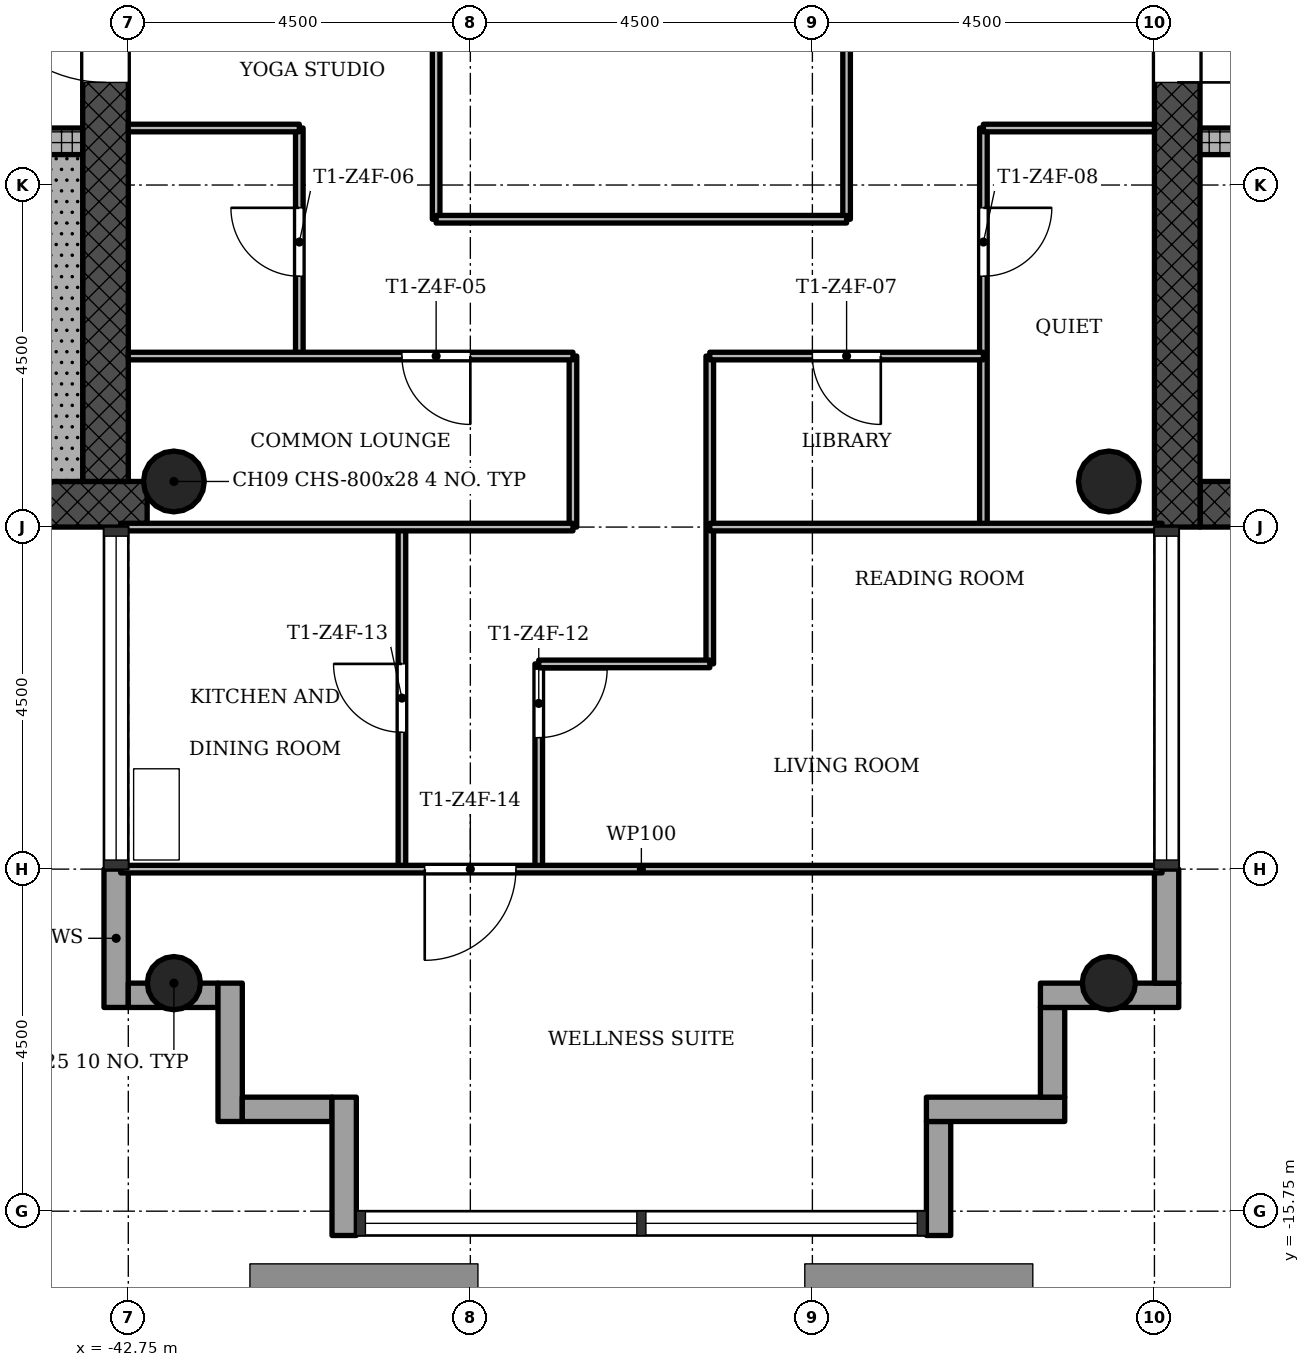
"""IFC4 building model, lengths in metres.
Left out: names, types, materials, properties, quantities, classifications, styles, units other than length and angle.
Written with IfcOpenShell. Run it as: python <this file> out.ifc"""

import sys

from ifc_helpers import new_model, si_unit, direction, frame, frame_2d, origin, origin_2d, place, context, subcontext, project, spatial, rectangle, hollow_circle, extrude, element, fill, save


model = new_model("IFC4")
c1 = context("Model", 3, precision=1e-05, world=origin(), true_north=direction((0.0, 1.0)))
c2 = subcontext(c1, "Body", "Model", "MODEL_VIEW")
j1 = project(units=[si_unit("LENGTHUNIT", "METRE"), si_unit("PLANEANGLEUNIT", "RADIAN")], contexts=[c1])
p1 = place(None, origin())
s1 = spatial("IfcSite", under=j1, at=p1, CompositionType="ELEMENT")
p2 = place(p1, origin())
s2 = spatial("IfcBuilding", under=s1, at=p2, CompositionType="ELEMENT")
p3 = place(p2, frame((0.0, 0.0, 216.4)))
s3 = spatial("IfcBuildingStorey", under=s2, at=p3, CompositionType="ELEMENT", Elevation=216.4)
p4 = place(p3, frame((-28.65, -6.45, 0.0), z_axis=(0.0, 0.0, 1.0), x_axis=(1.0, 0.0, 0.0)))
e1 = element("IfcWall", 1, at=p4, inside=s3, PredefinedType="SHEAR", context=c2, shape_type="SweptSolid", body=[
    extrude(rectangle(XDim=8.4, YDim=0.6, at=frame_2d((4.2, 0.0))), origin(), (0.0, 0.0, 1.0), 3.4),
])
p5 = place(p3, frame((-28.95, 6.15, 0.0), z_axis=(0.0, 0.0, 1.0), x_axis=(0.0, -1.0, 0.0)))
e2 = element("IfcWall", 2, at=p5, inside=s3, PredefinedType="SHEAR", context=c2, shape_type="SweptSolid", body=[
    extrude(rectangle(XDim=12.9, YDim=0.6, at=frame_2d((6.45, 0.0))), origin(), (0.0, 0.0, 1.0), 3.4),
])
p6 = place(p5, frame((5.25, 0.0, 0.0)))
e3 = element("IfcOpeningElement", 3, at=p6, cuts=e2, PredefinedType="OPENING", context=c2, shape_type="SweptSolid", body=[
    extrude(rectangle(XDim=1.8, YDim=2.1, at=frame_2d((0.9, 1.05))), frame((0.0, 0.31, 0.0), z_axis=(0.0, -1.0, 0.0), x_axis=(1.0, 0.0, 0.0)), (0.0, 0.0, 1.0), 0.62),
])
p7 = place(p3, frame((-28.65, -1.675, 0.0), z_axis=(0.0, 0.0, 1.0), x_axis=(1.0, 0.0, 0.0)))
e4 = element("IfcWall", 4, at=p7, inside=s3, PredefinedType="SHEAR", context=c2, shape_type="SweptSolid", body=[
    extrude(rectangle(XDim=7.8, YDim=0.35, at=frame_2d((3.9, 0.0))), origin(), (0.0, 0.0, 1.0), 3.4),
])
p8 = place(p7, frame((1.15, 0.0, 0.0)))
e5 = element("IfcOpeningElement", 5, at=p8, cuts=e4, PredefinedType="OPENING", context=c2, shape_type="SweptSolid", body=[
    extrude(rectangle(XDim=1.1, YDim=2.1, at=frame_2d((0.55, 1.05))), frame((0.0, 0.185, 0.0), z_axis=(0.0, -1.0, 0.0), x_axis=(1.0, 0.0, 0.0)), (0.0, 0.0, 1.0), 0.37),
])
p9 = place(p7, frame((3.35, 0.0, 0.0)))
e6 = element("IfcOpeningElement", 6, at=p9, cuts=e4, PredefinedType="OPENING", context=c2, shape_type="SweptSolid", body=[
    extrude(rectangle(XDim=1.1, YDim=2.1, at=frame_2d((0.55, 1.05))), frame((0.0, 0.185, 0.0), z_axis=(0.0, -1.0, 0.0), x_axis=(1.0, 0.0, 0.0)), (0.0, 0.0, 1.0), 0.37),
])
p10 = place(p7, frame((5.55, 0.0, 0.0)))
e7 = element("IfcOpeningElement", 7, at=p10, cuts=e4, PredefinedType="OPENING", context=c2, shape_type="SweptSolid", body=[
    extrude(rectangle(XDim=1.1, YDim=2.1, at=frame_2d((0.55, 1.05))), frame((0.0, 0.185, 0.0), z_axis=(0.0, -1.0, 0.0), x_axis=(1.0, 0.0, 0.0)), (0.0, 0.0, 1.0), 0.37),
])
p11 = place(p3, frame((-51.15, -6.45, 0.0), z_axis=(0.0, 0.0, 1.0), x_axis=(1.0, 0.0, 0.0)))
e8 = element("IfcWall", 8, at=p11, inside=s3, PredefinedType="SHEAR", context=c2, shape_type="SweptSolid", body=[
    extrude(rectangle(XDim=8.648, YDim=0.6, at=frame_2d((4.324, 0.0))), origin(), (0.0, 0.0, 1.0), 3.4),
])
p12 = place(p3, frame((-43.05, -6.15, 0.0), z_axis=(0.0, 0.0, 1.0), x_axis=(0.0, 1.0, 0.0)))
e9 = element("IfcWall", 9, at=p12, inside=s3, PredefinedType="SHEAR", context=c2, shape_type="SweptSolid", body=[
    extrude(rectangle(XDim=12.9, YDim=0.6, at=frame_2d((6.45, 0.0))), origin(), (0.0, 0.0, 1.0), 3.4),
])
p13 = place(p12, frame((5.25, 0.0, 0.0)))
e10 = element("IfcOpeningElement", 10, at=p13, cuts=e9, PredefinedType="OPENING", context=c2, shape_type="SweptSolid", body=[
    extrude(rectangle(XDim=1.8, YDim=2.1, at=frame_2d((0.9, 1.05))), frame((0.0, 0.31, 0.0), z_axis=(0.0, -1.0, 0.0), x_axis=(1.0, 0.0, 0.0)), (0.0, 0.0, 1.0), 0.62),
])
p14 = place(p3, frame((-51.15, -1.675, 0.0), z_axis=(0.0, 0.0, 1.0), x_axis=(1.0, 0.0, 0.0)))
e11 = element("IfcWall", 11, at=p14, inside=s3, PredefinedType="SHEAR", context=c2, shape_type="SweptSolid", body=[
    extrude(rectangle(XDim=7.8, YDim=0.35, at=frame_2d((3.9, 0.0))), origin(), (0.0, 0.0, 1.0), 3.4),
])
p15 = place(p14, frame((5.85, 0.0, 0.0)))
e12 = element("IfcOpeningElement", 12, at=p15, cuts=e11, PredefinedType="OPENING", context=c2, shape_type="SweptSolid", body=[
    extrude(rectangle(XDim=0.9, YDim=2.1, at=frame_2d((0.45, 1.05))), frame((0.0, 0.185, 0.0), z_axis=(0.0, -1.0, 0.0), x_axis=(1.0, 0.0, 0.0)), (0.0, 0.0, 1.0), 0.37),
])
for number, where, z_axis, x_axis in (
    (13, (-42.15, -12.75, 0.0), (0.0, 0.0, 1.0), (1.0, 0.0, 0.0)),
    (14, (-29.85, -12.75, 0.0), (0.0, 0.0, 1.0), (1.0, 0.0, 0.0)),
):
    element("IfcColumn", number, at=place(p3, frame(where, z_axis=z_axis, x_axis=x_axis)), inside=s3, PredefinedType="COLUMN", context=c2, shape_type="SweptSolid", body=[
        extrude(hollow_circle(Radius=0.35, WallThickness=0.025, at=origin_2d()), origin(), (0.0, 0.0, 1.0), 3.4),
    ])
for number, where, z_axis, x_axis in (
    (15, (-42.15, -6.15, 0.0), (0.0, 0.0, 1.0), (1.0, 0.0, 0.0)),
    (16, (-29.85, -6.15, 0.0), (0.0, 0.0, 1.0), (1.0, 0.0, 0.0)),
):
    element("IfcColumn", number, at=place(p3, frame(where, z_axis=z_axis, x_axis=x_axis)), inside=s3, PredefinedType="COLUMN", context=c2, shape_type="SweptSolid", body=[
        extrude(hollow_circle(Radius=0.4, WallThickness=0.028, at=origin_2d()), origin(), (0.0, 0.0, 1.0), 3.4),
    ])
p16 = place(p3, frame((-42.91, -11.25, -0.3), z_axis=(0.0, 0.0, 1.0), x_axis=(0.0, -1.0, 0.0)))
e17 = element("IfcWall", 17, at=p16, inside=s3, PredefinedType="STANDARD", context=c2, shape_type="SweptSolid", body=[
    extrude(rectangle(XDim=1.82, YDim=0.32, at=frame_2d((0.91, 0.0))), origin(), (0.0, 0.0, 1.0), 3.4),
])
p17 = place(p3, frame((-42.75, -12.91, -0.3), z_axis=(0.0, 0.0, 1.0), x_axis=(1.0, 0.0, 0.0)))
e18 = element("IfcWall", 18, at=p17, inside=s3, PredefinedType="STANDARD", context=c2, shape_type="SweptSolid", body=[
    extrude(rectangle(XDim=1.18, YDim=0.32, at=frame_2d((0.59, 0.0))), origin(), (0.0, 0.0, 1.0), 3.4),
])
p18 = place(p3, frame((-41.41, -12.75, -0.3), z_axis=(0.0, 0.0, 1.0), x_axis=(0.0, -1.0, 0.0)))
e19 = element("IfcWall", 19, at=p18, inside=s3, PredefinedType="STANDARD", context=c2, shape_type="SweptSolid", body=[
    extrude(rectangle(XDim=1.82, YDim=0.32, at=frame_2d((0.91, 0.0))), origin(), (0.0, 0.0, 1.0), 3.4),
])
p19 = place(p3, frame((-41.25, -14.41, -0.3), z_axis=(0.0, 0.0, 1.0), x_axis=(1.0, 0.0, 0.0)))
e20 = element("IfcWall", 20, at=p19, inside=s3, PredefinedType="STANDARD", context=c2, shape_type="SweptSolid", body=[
    extrude(rectangle(XDim=1.18, YDim=0.32, at=frame_2d((0.59, 0.0))), origin(), (0.0, 0.0, 1.0), 3.4),
])
p20 = place(p3, frame((-39.91, -14.25, -0.3), z_axis=(0.0, 0.0, 1.0), x_axis=(0.0, -1.0, 0.0)))
e21 = element("IfcWall", 21, at=p20, inside=s3, PredefinedType="STANDARD", context=c2, shape_type="SweptSolid", body=[
    extrude(rectangle(XDim=1.82, YDim=0.32, at=frame_2d((0.91, 0.0))), origin(), (0.0, 0.0, 1.0), 3.4),
])
p21 = place(p3, frame((-32.09, -16.07, -0.3), z_axis=(0.0, 0.0, 1.0), x_axis=(0.0, 1.0, 0.0)))
e22 = element("IfcWall", 22, at=p21, inside=s3, PredefinedType="STANDARD", context=c2, shape_type="SweptSolid", body=[
    extrude(rectangle(XDim=1.5, YDim=0.32, at=frame_2d((0.75, 0.0))), origin(), (0.0, 0.0, 1.0), 3.4),
])
p22 = place(p3, frame((-32.25, -14.41, -0.3), z_axis=(0.0, 0.0, 1.0), x_axis=(1.0, 0.0, 0.0)))
e23 = element("IfcWall", 23, at=p22, inside=s3, PredefinedType="STANDARD", context=c2, shape_type="SweptSolid", body=[
    extrude(rectangle(XDim=1.82, YDim=0.32, at=frame_2d((0.91, 0.0))), origin(), (0.0, 0.0, 1.0), 3.4),
])
p23 = place(p3, frame((-30.59, -14.25, -0.3), z_axis=(0.0, 0.0, 1.0), x_axis=(0.0, 1.0, 0.0)))
e24 = element("IfcWall", 24, at=p23, inside=s3, PredefinedType="STANDARD", context=c2, shape_type="SweptSolid", body=[
    extrude(rectangle(XDim=1.18, YDim=0.32, at=frame_2d((0.59, 0.0))), origin(), (0.0, 0.0, 1.0), 3.4),
])
p24 = place(p3, frame((-30.75, -12.91, -0.3), z_axis=(0.0, 0.0, 1.0), x_axis=(1.0, 0.0, 0.0)))
e25 = element("IfcWall", 25, at=p24, inside=s3, PredefinedType="STANDARD", context=c2, shape_type="SweptSolid", body=[
    extrude(rectangle(XDim=1.82, YDim=0.32, at=frame_2d((0.91, 0.0))), origin(), (0.0, 0.0, 1.0), 3.4),
])
p25 = place(p3, frame((-29.09, -12.75, -0.3), z_axis=(0.0, 0.0, 1.0), x_axis=(0.0, 1.0, 0.0)))
e26 = element("IfcWall", 26, at=p25, inside=s3, PredefinedType="STANDARD", context=c2, shape_type="SweptSolid", body=[
    extrude(rectangle(XDim=1.5, YDim=0.32, at=frame_2d((0.75, 0.0))), origin(), (0.0, 0.0, 1.0), 3.4),
])
p26 = place(p3, frame((-40.5, -4.5, 0.0), z_axis=(0.0, 0.0, 1.0), x_axis=(0.0, 1.0, 0.0)))
e27 = element("IfcWall", 27, at=p26, inside=s3, PredefinedType="PARTITIONING", context=c2, shape_type="SweptSolid", body=[
    extrude(rectangle(XDim=3.0, YDim=0.1, at=frame_2d((1.5, 0.0))), origin(), (0.0, 0.0, 1.0), 3.0),
])
p27 = place(p26, frame((1.05, 0.0, 0.0)))
e28 = element("IfcOpeningElement", 28, at=p27, cuts=e27, PredefinedType="OPENING", context=c2, shape_type="SweptSolid", body=[
    extrude(rectangle(XDim=0.9, YDim=2.1, at=frame_2d((0.45, 1.05))), frame((0.0, 0.06, 0.0), z_axis=(0.0, -1.0, 0.0), x_axis=(1.0, 0.0, 0.0)), (0.0, 0.0, 1.0), 0.12),
])
p28 = place(p3, frame((-39.15, -11.25, 0.0), z_axis=(0.0, 0.0, 1.0), x_axis=(0.0, 1.0, 0.0)))
e29 = element("IfcWall", 29, at=p28, inside=s3, PredefinedType="PARTITIONING", context=c2, shape_type="SweptSolid", body=[
    extrude(rectangle(XDim=4.5, YDim=0.1, at=frame_2d((2.25, 0.0))), origin(), (0.0, 0.0, 1.0), 3.0),
])
p29 = place(p28, frame((1.8, 0.0, 0.0)))
e30 = element("IfcOpeningElement", 30, at=p29, cuts=e29, PredefinedType="OPENING", context=c2, shape_type="SweptSolid", body=[
    extrude(rectangle(XDim=0.9, YDim=2.1, at=frame_2d((0.45, 1.05))), frame((0.0, 0.06, 0.0), z_axis=(0.0, -1.0, 0.0), x_axis=(1.0, 0.0, 0.0)), (0.0, 0.0, 1.0), 0.12),
])
p30 = place(p3, frame((-38.7, -2.7, 0.0), z_axis=(0.0, 0.0, 1.0), x_axis=(0.0, 1.0, 0.0)))
e31 = element("IfcWall", 31, at=p30, inside=s3, PredefinedType="PARTITIONING", context=c2, shape_type="SweptSolid", body=[
    extrude(rectangle(XDim=5.4, YDim=0.1, at=frame_2d((2.7, 0.0))), origin(), (0.0, 0.0, 1.0), 3.0),
])
p31 = place(p3, frame((-37.35, -11.25, 0.0), z_axis=(0.0, 0.0, 1.0), x_axis=(0.0, 1.0, 0.0)))
e32 = element("IfcWall", 32, at=p31, inside=s3, PredefinedType="PARTITIONING", context=c2, shape_type="SweptSolid", body=[
    extrude(rectangle(XDim=2.7, YDim=0.1, at=frame_2d((1.35, 0.0))), origin(), (0.0, 0.0, 1.0), 3.0),
])
p32 = place(p31, frame((1.73, 0.0, 0.0)))
e33 = element("IfcOpeningElement", 33, at=p32, cuts=e32, PredefinedType="OPENING", context=c2, shape_type="SweptSolid", body=[
    extrude(rectangle(XDim=0.9, YDim=2.1, at=frame_2d((0.45, 1.05))), frame((0.0, 0.06, 0.0), z_axis=(0.0, -1.0, 0.0), x_axis=(1.0, 0.0, 0.0)), (0.0, 0.0, 1.0), 0.12),
])
p33 = place(p3, frame((-36.9, -6.75, 0.0), z_axis=(0.0, 0.0, 1.0), x_axis=(0.0, 1.0, 0.0)))
e34 = element("IfcWall", 34, at=p33, inside=s3, PredefinedType="PARTITIONING", context=c2, shape_type="SweptSolid", body=[
    extrude(rectangle(XDim=2.25, YDim=0.1, at=frame_2d((1.125, 0.0))), origin(), (0.0, 0.0, 1.0), 3.0),
])
p34 = place(p3, frame((-35.1, -8.55, 0.0), z_axis=(0.0, 0.0, 1.0), x_axis=(0.0, 1.0, 0.0)))
e35 = element("IfcWall", 35, at=p34, inside=s3, PredefinedType="PARTITIONING", context=c2, shape_type="SweptSolid", body=[
    extrude(rectangle(XDim=4.05, YDim=0.1, at=frame_2d((2.025, 0.0))), origin(), (0.0, 0.0, 1.0), 3.0),
])
p35 = place(p3, frame((-33.3, -2.7, 0.0), z_axis=(0.0, 0.0, 1.0), x_axis=(0.0, 1.0, 0.0)))
e36 = element("IfcWall", 36, at=p35, inside=s3, PredefinedType="PARTITIONING", context=c2, shape_type="SweptSolid", body=[
    extrude(rectangle(XDim=5.4, YDim=0.1, at=frame_2d((2.7, 0.0))), origin(), (0.0, 0.0, 1.0), 3.0),
])
p36 = place(p3, frame((-31.5, -6.75, 0.0), z_axis=(0.0, 0.0, 1.0), x_axis=(0.0, 1.0, 0.0)))
e37 = element("IfcWall", 37, at=p36, inside=s3, PredefinedType="PARTITIONING", context=c2, shape_type="SweptSolid", body=[
    extrude(rectangle(XDim=5.25, YDim=0.1, at=frame_2d((2.625, 0.0))), origin(), (0.0, 0.0, 1.0), 3.0),
])
p37 = place(p36, frame((3.3, 0.0, 0.0)))
e38 = element("IfcOpeningElement", 38, at=p37, cuts=e37, PredefinedType="OPENING", context=c2, shape_type="SweptSolid", body=[
    extrude(rectangle(XDim=0.9, YDim=2.1, at=frame_2d((0.45, 1.05))), frame((0.0, 0.06, 0.0), z_axis=(0.0, -1.0, 0.0), x_axis=(1.0, 0.0, 0.0)), (0.0, 0.0, 1.0), 0.12),
])
p38 = place(p3, frame((-42.85, -11.25, 0.0), z_axis=(0.0, 0.0, 1.0), x_axis=(1.0, 0.0, 0.0)))
e39 = element("IfcWall", 39, at=p38, inside=s3, PredefinedType="PARTITIONING", context=c2, shape_type="SweptSolid", body=[
    extrude(rectangle(XDim=13.7, YDim=0.1, at=frame_2d((6.85, 0.0))), origin(), (0.0, 0.0, 1.0), 3.0),
])
p39 = place(p38, frame((4.0, 0.0, 0.0)))
e40 = element("IfcOpeningElement", 40, at=p39, cuts=e39, PredefinedType="OPENING", context=c2, shape_type="SweptSolid", body=[
    extrude(rectangle(XDim=1.2, YDim=2.1, at=frame_2d((0.6, 1.05))), frame((0.0, 0.06, 0.0), z_axis=(0.0, -1.0, 0.0), x_axis=(1.0, 0.0, 0.0)), (0.0, 0.0, 1.0), 0.12),
])
p40 = place(p3, frame((-37.35, -8.55, 0.0), z_axis=(0.0, 0.0, 1.0), x_axis=(1.0, 0.0, 0.0)))
e41 = element("IfcWall", 41, at=p40, inside=s3, PredefinedType="PARTITIONING", context=c2, shape_type="SweptSolid", body=[
    extrude(rectangle(XDim=2.25, YDim=0.1, at=frame_2d((1.125, 0.0))), origin(), (0.0, 0.0, 1.0), 3.0),
])
for number, where, z_axis, x_axis in (
    (42, (-42.85, -6.75, 0.0), (0.0, 0.0, 1.0), (1.0, 0.0, 0.0)),
    (43, (-35.1, -6.75, 0.0), (0.0, 0.0, 1.0), (1.0, 0.0, 0.0)),
):
    element("IfcWall", number, at=place(p3, frame(where, z_axis=z_axis, x_axis=x_axis)), inside=s3, PredefinedType="PARTITIONING", context=c2, shape_type="SweptSolid", body=[
        extrude(rectangle(XDim=5.95, YDim=0.1, at=frame_2d((2.975, 0.0))), origin(), (0.0, 0.0, 1.0), 3.0),
    ])
p41 = place(p3, frame((-42.75, -4.5, 0.0), z_axis=(0.0, 0.0, 1.0), x_axis=(1.0, 0.0, 0.0)))
e44 = element("IfcWall", 44, at=p41, inside=s3, PredefinedType="PARTITIONING", context=c2, shape_type="SweptSolid", body=[
    extrude(rectangle(XDim=5.85, YDim=0.1, at=frame_2d((2.925, 0.0))), origin(), (0.0, 0.0, 1.0), 3.0),
])
p42 = place(p41, frame((3.6, 0.0, 0.0)))
e45 = element("IfcOpeningElement", 45, at=p42, cuts=e44, PredefinedType="OPENING", context=c2, shape_type="SweptSolid", body=[
    extrude(rectangle(XDim=0.9, YDim=2.1, at=frame_2d((0.45, 1.05))), frame((0.0, 0.06, 0.0), z_axis=(0.0, -1.0, 0.0), x_axis=(1.0, 0.0, 0.0)), (0.0, 0.0, 1.0), 0.12),
])
p43 = place(p3, frame((-35.1, -4.5, 0.0), z_axis=(0.0, 0.0, 1.0), x_axis=(1.0, 0.0, 0.0)))
e46 = element("IfcWall", 46, at=p43, inside=s3, PredefinedType="PARTITIONING", context=c2, shape_type="SweptSolid", body=[
    extrude(rectangle(XDim=3.6, YDim=0.1, at=frame_2d((1.8, 0.0))), origin(), (0.0, 0.0, 1.0), 3.0),
])
p44 = place(p43, frame((1.35, 0.0, 0.0)))
e47 = element("IfcOpeningElement", 47, at=p44, cuts=e46, PredefinedType="OPENING", context=c2, shape_type="SweptSolid", body=[
    extrude(rectangle(XDim=0.9, YDim=2.1, at=frame_2d((0.45, 1.05))), frame((0.0, 0.06, 0.0), z_axis=(0.0, -1.0, 0.0), x_axis=(1.0, 0.0, 0.0)), (0.0, 0.0, 1.0), 0.12),
])
p45 = place(p3, frame((-38.7, -2.7, 0.0), z_axis=(0.0, 0.0, 1.0), x_axis=(1.0, 0.0, 0.0)))
e48 = element("IfcWall", 48, at=p45, inside=s3, PredefinedType="PARTITIONING", context=c2, shape_type="SweptSolid", body=[
    extrude(rectangle(XDim=5.4, YDim=0.1, at=frame_2d((2.7, 0.0))), origin(), (0.0, 0.0, 1.0), 3.0),
])
for number, where, z_axis, x_axis in (
    (49, (-42.75, -1.5, 0.0), (0.0, 0.0, 1.0), (1.0, 0.0, 0.0)),
    (50, (-31.5, -1.5, 0.0), (0.0, 0.0, 1.0), (1.0, 0.0, 0.0)),
):
    element("IfcWall", number, at=place(p3, frame(where, z_axis=z_axis, x_axis=x_axis)), inside=s3, PredefinedType="PARTITIONING", context=c2, shape_type="SweptSolid", body=[
        extrude(rectangle(XDim=2.25, YDim=0.1, at=frame_2d((1.125, 0.0))), origin(), (0.0, 0.0, 1.0), 3.0),
    ])
p46 = place(p3, frame((-43.65, -1.85, 0.0), z_axis=(0.0, 0.0, 1.0), x_axis=(0.0, -1.0, 0.0)))
e51 = element("IfcWall", 51, at=p46, inside=s3, PredefinedType="SHEAR", context=c2, shape_type="SweptSolid", body=[
    extrude(rectangle(XDim=4.3, YDim=0.6, at=frame_2d((2.15, 0.0))), origin(), (0.0, 0.0, 1.0), 3.4),
])
p47 = place(p42, origin())
e52 = element("IfcDoor", 52, at=p47, inside=s3, OperationType="SINGLE_SWING_RIGHT", PredefinedType="DOOR", context=c2, shape_type="SweptSolid", body=[
    extrude(rectangle(XDim=0.9, YDim=2.1, at=frame_2d((0.45, 1.05))), frame((0.0, 0.025, 0.0), z_axis=(0.0, -1.0, 0.0), x_axis=(1.0, 0.0, 0.0)), (0.0, 0.0, 1.0), 0.05),
])
fill(e45, e52)
p48 = place(p27, origin())
e53 = element("IfcDoor", 53, at=p48, inside=s3, OperationType="SINGLE_SWING_LEFT", PredefinedType="DOOR", context=c2, shape_type="SweptSolid", body=[
    extrude(rectangle(XDim=0.9, YDim=2.1, at=frame_2d((0.45, 1.05))), frame((0.0, 0.025, 0.0), z_axis=(0.0, -1.0, 0.0), x_axis=(1.0, 0.0, 0.0)), (0.0, 0.0, 1.0), 0.05),
])
fill(e28, e53)
p49 = place(p44, origin())
e54 = element("IfcDoor", 54, at=p49, inside=s3, OperationType="SINGLE_SWING_RIGHT", PredefinedType="DOOR", context=c2, shape_type="SweptSolid", body=[
    extrude(rectangle(XDim=0.9, YDim=2.1, at=frame_2d((0.45, 1.05))), frame((0.0, 0.025, 0.0), z_axis=(0.0, -1.0, 0.0), x_axis=(1.0, 0.0, 0.0)), (0.0, 0.0, 1.0), 0.05),
])
fill(e47, e54)
p50 = place(p37, origin())
e55 = element("IfcDoor", 55, at=p50, inside=s3, OperationType="SINGLE_SWING_RIGHT", PredefinedType="DOOR", context=c2, shape_type="SweptSolid", body=[
    extrude(rectangle(XDim=0.9, YDim=2.1, at=frame_2d((0.45, 1.05))), frame((0.0, 0.025, 0.0), z_axis=(0.0, -1.0, 0.0), x_axis=(1.0, 0.0, 0.0)), (0.0, 0.0, 1.0), 0.05),
])
fill(e38, e55)
p51 = place(p32, origin())
e56 = element("IfcDoor", 56, at=p51, inside=s3, OperationType="SINGLE_SWING_RIGHT", PredefinedType="DOOR", context=c2, shape_type="SweptSolid", body=[
    extrude(rectangle(XDim=0.9, YDim=2.1, at=frame_2d((0.45, 1.05))), frame((0.0, 0.025, 0.0), z_axis=(0.0, -1.0, 0.0), x_axis=(1.0, 0.0, 0.0)), (0.0, 0.0, 1.0), 0.05),
])
fill(e33, e56)
p52 = place(p29, origin())
e57 = element("IfcDoor", 57, at=p52, inside=s3, OperationType="SINGLE_SWING_LEFT", PredefinedType="DOOR", context=c2, shape_type="SweptSolid", body=[
    extrude(rectangle(XDim=0.9, YDim=2.1, at=frame_2d((0.45, 1.05))), frame((0.0, 0.025, 0.0), z_axis=(0.0, -1.0, 0.0), x_axis=(1.0, 0.0, 0.0)), (0.0, 0.0, 1.0), 0.05),
])
fill(e30, e57)
p53 = place(p39, origin())
e58 = element("IfcDoor", 58, at=p53, inside=s3, OperationType="SINGLE_SWING_LEFT", PredefinedType="DOOR", context=c2, shape_type="SweptSolid", body=[
    extrude(rectangle(XDim=1.2, YDim=2.1, at=frame_2d((0.6, 1.05))), frame((0.0, 0.025, 0.0), z_axis=(0.0, -1.0, 0.0), x_axis=(1.0, 0.0, 0.0)), (0.0, 0.0, 1.0), 0.05),
])
fill(e40, e58)
p54 = place(p6, origin())
e59 = element("IfcDoor", 59, at=p54, inside=s3, OperationType="SINGLE_SWING_LEFT", PredefinedType="DOOR", context=c2, shape_type="SweptSolid", body=[
    extrude(rectangle(XDim=1.8, YDim=2.1, at=frame_2d((0.9, 1.05))), frame((0.0, 0.025, 0.0), z_axis=(0.0, -1.0, 0.0), x_axis=(1.0, 0.0, 0.0)), (0.0, 0.0, 1.0), 0.05),
])
fill(e3, e59)
p55 = place(p13, origin())
e60 = element("IfcDoor", 60, at=p55, inside=s3, OperationType="SINGLE_SWING_LEFT", PredefinedType="DOOR", context=c2, shape_type="SweptSolid", body=[
    extrude(rectangle(XDim=1.8, YDim=2.1, at=frame_2d((0.9, 1.05))), frame((0.0, 0.025, 0.0), z_axis=(0.0, -1.0, 0.0), x_axis=(1.0, 0.0, 0.0)), (0.0, 0.0, 1.0), 0.05),
])
fill(e10, e60)
save(model, sys.argv[1])
